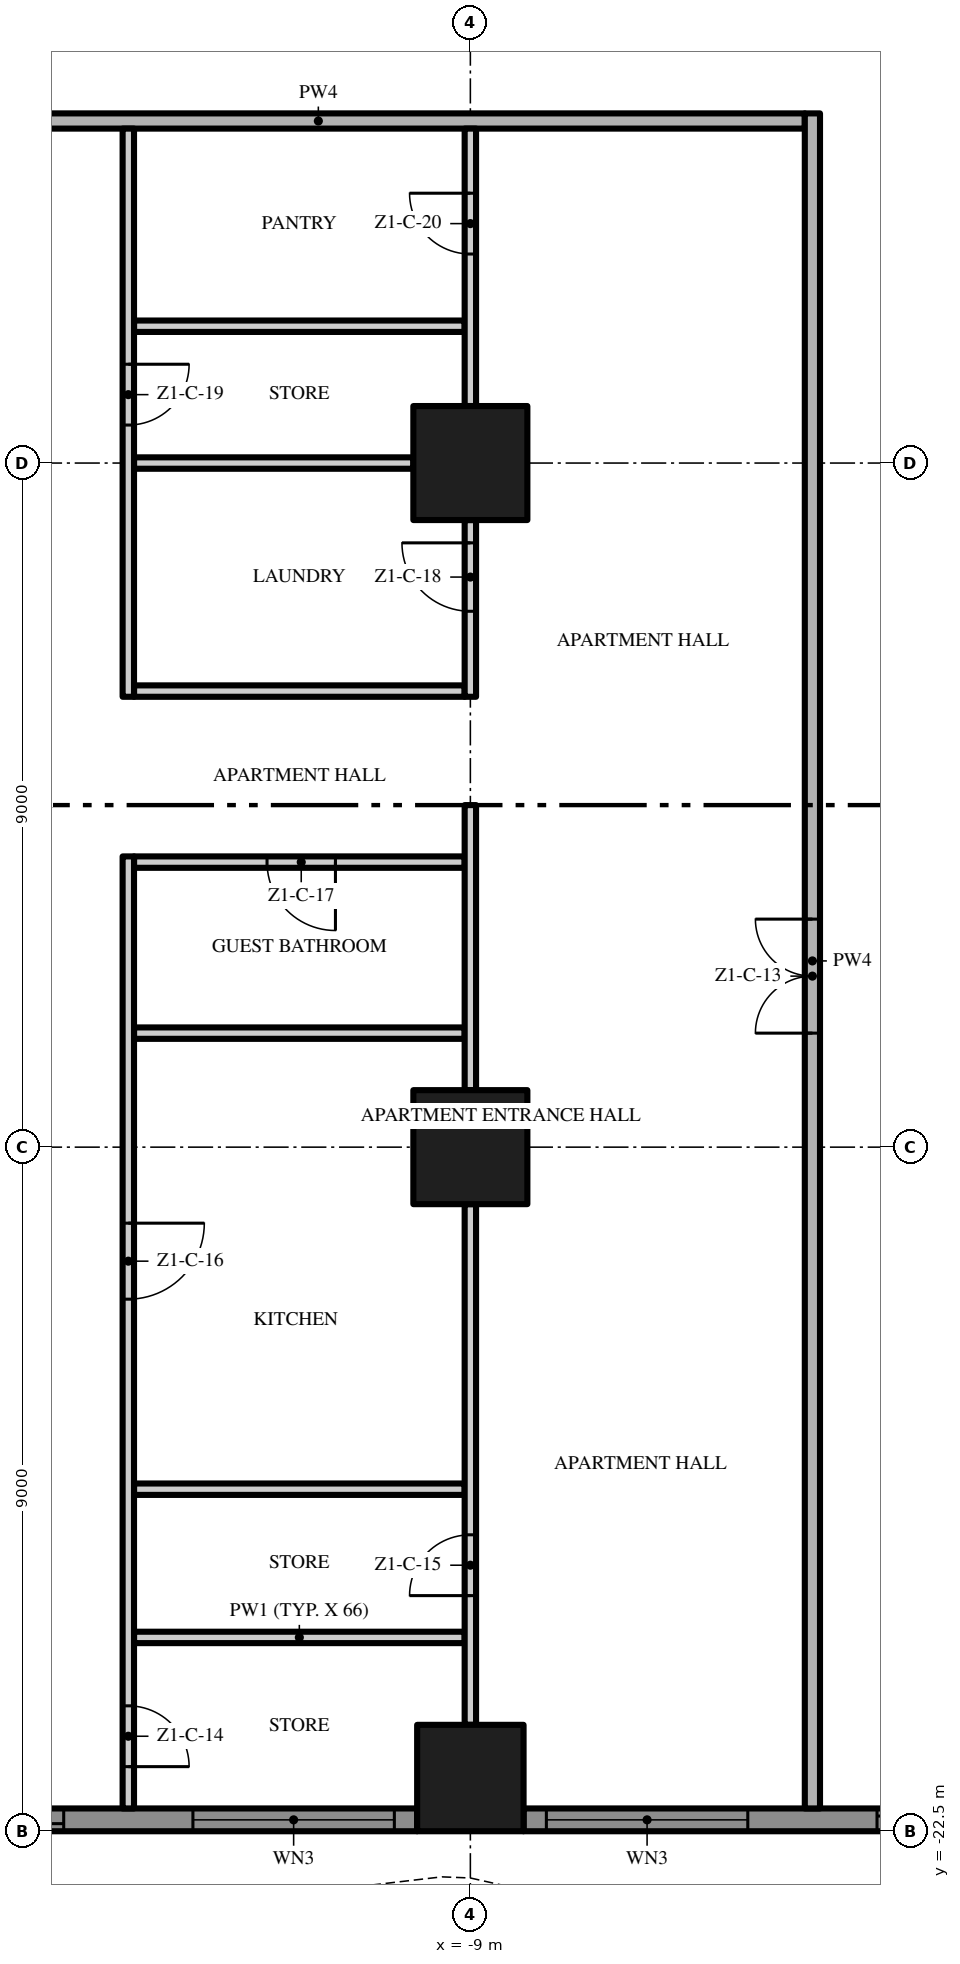
"""IFC4 building model, lengths in metres.
Left out: names, types, materials, properties, quantities, classifications, styles, units other than length and angle.
Written with IfcOpenShell. Run it as: python <this file> out.ifc"""

import sys

from ifc_helpers import new_model, si_unit, direction, frame, frame_2d, origin, origin_2d, place, context, subcontext, project, spatial, polyline, rectangle, outline, extrude, element, fill, save


model = new_model("IFC4")
c1 = context("Model", 3, precision=1e-05, world=origin(), true_north=direction((0.0, 1.0)))
c2 = subcontext(c1, "Body", "Model", "MODEL_VIEW")
j1 = project(units=[si_unit("LENGTHUNIT", "METRE"), si_unit("PLANEANGLEUNIT", "RADIAN")], contexts=[c1])
p1 = place(None, origin())
s1 = spatial("IfcSite", under=j1, at=p1, CompositionType="ELEMENT")
p2 = place(p1, origin())
s2 = spatial("IfcBuilding", under=s1, at=p2, CompositionType="ELEMENT")
p3 = place(p2, frame((0.0, 0.0, 41.6)))
s3 = spatial("IfcBuildingStorey", under=s2, at=p3, CompositionType="ELEMENT", Elevation=41.6)
p4 = place(p3, frame((-9.0, -13.5, 0.0), z_axis=(0.0, 0.0, 1.0), x_axis=(1.0, 0.0, 0.0)))
e1 = element("IfcColumn", 1, at=p4, inside=s3, PredefinedType="COLUMN", context=c2, shape_type="SweptSolid", body=[
    extrude(rectangle(XDim=1.5, YDim=1.5, at=origin_2d()), origin(), (0.0, 0.0, 1.0), 3.5),
])
p5 = place(p3, frame((-9.0, -21.8, 0.0), z_axis=(0.0, 0.0, 1.0), x_axis=(1.0, 0.0, 0.0)))
e2 = element("IfcColumn", 2, at=p5, inside=s3, PredefinedType="COLUMN", context=c2, shape_type="SweptSolid", body=[
    extrude(rectangle(XDim=1.4, YDim=1.4, at=origin_2d()), origin(), (0.0, 0.0, 1.0), 3.5),
])
p6 = place(p3, frame((-9.0, -4.5, 0.0), z_axis=(0.0, 0.0, 1.0), x_axis=(1.0, 0.0, 0.0)))
e3 = element("IfcColumn", 3, at=p6, inside=s3, PredefinedType="COLUMN", context=c2, shape_type="SweptSolid", body=[
    extrude(rectangle(XDim=1.5, YDim=1.5, at=origin_2d()), origin(), (0.0, 0.0, 1.0), 3.5),
])
p7 = place(p3, frame((-9.7, -22.35, 0.0), z_axis=(0.0, 0.0, 1.0), x_axis=(-1.0, 0.0, 0.0)))
e4 = element("IfcWall", 4, at=p7, inside=s3, PredefinedType="SOLIDWALL", context=c2, shape_type="SweptSolid", body=[
    extrude(rectangle(XDim=7.6, YDim=0.3, at=frame_2d((3.8, 0.0))), origin(), (0.0, 0.0, 1.0), 3.5),
])
p8 = place(p7, frame((4.65, 0.0, 0.0)))
e5 = element("IfcOpeningElement", 5, at=p8, cuts=e4, PredefinedType="OPENING", context=c2, shape_type="SweptSolid", body=[
    extrude(rectangle(XDim=2.65, YDim=2.4, at=frame_2d((1.325, 1.2))), frame((0.0, 0.16, 0.0), z_axis=(0.0, -1.0, 0.0), x_axis=(1.0, 0.0, 0.0)), (0.0, 0.0, 1.0), 0.32),
])
p9 = place(p7, frame((0.3, 0.0, 0.45)))
e6 = element("IfcOpeningElement", 6, at=p9, cuts=e4, PredefinedType="OPENING", context=c2, shape_type="SweptSolid", body=[
    extrude(rectangle(XDim=2.65, YDim=2.65, at=frame_2d((1.325, 1.325))), frame((0.0, 0.16, 0.0), z_axis=(0.0, -1.0, 0.0), x_axis=(1.0, 0.0, 0.0)), (0.0, 0.0, 1.0), 0.32),
])
p10 = place(p3, frame((-0.7, -22.35, 0.0), z_axis=(0.0, 0.0, 1.0), x_axis=(-1.0, 0.0, 0.0)))
e7 = element("IfcWall", 7, at=p10, inside=s3, PredefinedType="SOLIDWALL", context=c2, shape_type="SweptSolid", body=[
    extrude(rectangle(XDim=7.6, YDim=0.3, at=frame_2d((3.8, 0.0))), origin(), (0.0, 0.0, 1.0), 3.5),
])
p11 = place(p10, frame((4.65, 0.0, 0.45)))
e8 = element("IfcOpeningElement", 8, at=p11, cuts=e7, PredefinedType="OPENING", context=c2, shape_type="SweptSolid", body=[
    extrude(rectangle(XDim=2.65, YDim=2.65, at=frame_2d((1.325, 1.325))), frame((0.0, 0.16, 0.0), z_axis=(0.0, -1.0, 0.0), x_axis=(1.0, 0.0, 0.0)), (0.0, 0.0, 1.0), 0.32),
])
p12 = place(p10, frame((0.3, 0.0, 0.0)))
e9 = element("IfcOpeningElement", 9, at=p12, cuts=e7, PredefinedType="OPENING", context=c2, shape_type="SweptSolid", body=[
    extrude(rectangle(XDim=2.65, YDim=2.4, at=frame_2d((1.325, 1.2))), frame((0.0, 0.16, 0.0), z_axis=(0.0, -1.0, 0.0), x_axis=(1.0, 0.0, 0.0)), (0.0, 0.0, 1.0), 0.32),
])
p13 = place(p3, origin())
e10 = element("IfcWall", 10, at=p13, inside=s3, PredefinedType="USERDEFINED", context=c2, shape_type="SweptSolid", body=[
    extrude(outline(polyline([(-22.5, -23.451), (-21.0, -24.112), (-19.5, -24.845), (-18.0, -25.369), (-16.875, -25.5), (-16.5, -25.485), (-15.0, -25.149), (-13.5, -24.488), (-12.0, -23.755), (-10.5, -23.231), (-9.375, -23.1), (-9.0, -23.115), (-7.5, -23.451), (-6.0, -24.112), (-4.5, -24.845), (-3.0, -25.369), (-1.875, -25.5), (-1.5, -25.485), (0.0, -25.149), (1.5, -24.488), (3.0, -23.755), (4.5, -23.231), (5.625, -23.1), (6.0, -23.115), (7.5, -23.451), (9.0, -24.112), (10.5, -24.845), (12.0, -25.369), (13.125, -25.5), (13.5, -25.485), (15.0, -25.149), (16.5, -24.488), (18.0, -23.755), (19.5, -23.231), (20.625, -23.1), (21.0, -23.115), (22.5, -23.451), (22.555, -23.208), (21.033, -22.866), (20.615, -22.849), (19.444, -22.986), (17.904, -23.524), (16.395, -24.261), (14.921, -24.91), (13.467, -25.236), (13.135, -25.249), (12.056, -25.124), (10.596, -24.614), (9.105, -23.885), (7.579, -23.213), (6.033, -22.866), (5.615, -22.849), (4.444, -22.986), (2.904, -23.524), (1.395, -24.261), (-0.079, -24.91), (-1.533, -25.236), (-1.865, -25.249), (-2.944, -25.124), (-4.404, -24.614), (-5.895, -23.885), (-7.421, -23.213), (-8.967, -22.866), (-9.385, -22.849), (-10.556, -22.986), (-12.096, -23.524), (-13.605, -24.261), (-15.079, -24.91), (-16.533, -25.236), (-16.865, -25.249), (-17.944, -25.124), (-19.404, -24.614), (-20.895, -23.885), (-22.399, -23.223), (-22.5, -23.451)])), origin(), (0.0, 0.0, 1.0), 0.9),
])
for number, where, z_axis, x_axis in (
    (11, (-13.425, -19.95, 0.0), (0.0, 0.0, 1.0), (1.0, 0.0, 0.0)),
    (12, (-13.425, -18.0, 0.0), (0.0, 0.0, 1.0), (1.0, 0.0, 0.0)),
    (13, (-13.425, -12.0, 0.0), (0.0, 0.0, 1.0), (1.0, 0.0, 0.0)),
):
    element("IfcWall", number, at=place(p3, frame(where, z_axis=z_axis, x_axis=x_axis)), inside=s3, PredefinedType="PARTITIONING", context=c2, shape_type="SweptSolid", body=[
        extrude(rectangle(XDim=4.35, YDim=0.15, at=frame_2d((2.175, 0.0))), origin(), (0.0, 0.0, 1.0), 3.5),
    ])
p14 = place(p3, frame((-9.075, -9.75, 0.0), z_axis=(0.0, 0.0, 1.0), x_axis=(-1.0, 0.0, 0.0)))
e14 = element("IfcWall", 14, at=p14, inside=s3, PredefinedType="PARTITIONING", context=c2, shape_type="SweptSolid", body=[
    extrude(rectangle(XDim=4.35, YDim=0.15, at=frame_2d((2.175, 0.0))), origin(), (0.0, 0.0, 1.0), 3.5),
])
p15 = place(p14, frame((1.7, 0.0, 0.0)))
e15 = element("IfcOpeningElement", 15, at=p15, cuts=e14, PredefinedType="OPENING", context=c2, shape_type="SweptSolid", body=[
    extrude(rectangle(XDim=0.9, YDim=2.1, at=frame_2d((0.45, 1.05))), frame((0.0, 0.085, 0.0), z_axis=(0.0, -1.0, 0.0), x_axis=(1.0, 0.0, 0.0)), (0.0, 0.0, 1.0), 0.17),
])
p16 = place(p3, frame((-13.425, -7.5, 0.0), z_axis=(0.0, 0.0, 1.0), x_axis=(1.0, 0.0, 0.0)))
e16 = element("IfcWall", 16, at=p16, inside=s3, PredefinedType="PARTITIONING", context=c2, shape_type="SweptSolid", body=[
    extrude(rectangle(XDim=4.35, YDim=0.15, at=frame_2d((2.175, 0.0))), origin(), (0.0, 0.0, 1.0), 3.5),
])
p17 = place(p3, frame((-13.425, -4.5, 0.0), z_axis=(0.0, 0.0, 1.0), x_axis=(1.0, 0.0, 0.0)))
e17 = element("IfcWall", 17, at=p17, inside=s3, PredefinedType="PARTITIONING", context=c2, shape_type="SweptSolid", body=[
    extrude(rectangle(XDim=3.675, YDim=0.15, at=frame_2d((1.837, 0.0))), origin(), (0.0, 0.0, 1.0), 3.5),
])
p18 = place(p3, frame((-13.425, -2.7, 0.0), z_axis=(0.0, 0.0, 1.0), x_axis=(1.0, 0.0, 0.0)))
e18 = element("IfcWall", 18, at=p18, inside=s3, PredefinedType="PARTITIONING", context=c2, shape_type="SweptSolid", body=[
    extrude(rectangle(XDim=4.35, YDim=0.15, at=frame_2d((2.175, 0.0))), origin(), (0.0, 0.0, 1.0), 3.5),
])
p19 = place(p3, frame((-17.4, 0.0, 0.0), z_axis=(0.0, 0.0, 1.0), x_axis=(1.0, 0.0, 0.0)))
e19 = element("IfcWall", 19, at=p19, inside=s3, PredefinedType="PARTITIONING", context=c2, shape_type="SweptSolid", body=[
    extrude(rectangle(XDim=12.8, YDim=0.2, at=frame_2d((6.4, 0.0))), origin(), (0.0, 0.0, 1.0), 3.5),
])
p20 = place(p3, frame((-13.5, -9.675, 0.0), z_axis=(0.0, 0.0, 1.0), x_axis=(0.0, -1.0, 0.0)))
e20 = element("IfcWall", 20, at=p20, inside=s3, PredefinedType="PARTITIONING", context=c2, shape_type="SweptSolid", body=[
    extrude(rectangle(XDim=12.525, YDim=0.15, at=frame_2d((6.263, 0.0))), origin(), (0.0, 0.0, 1.0), 3.5),
])
p21 = place(p20, frame((11.175, 0.0, 0.0)))
e21 = element("IfcOpeningElement", 21, at=p21, cuts=e20, PredefinedType="OPENING", context=c2, shape_type="SweptSolid", body=[
    extrude(rectangle(XDim=0.8, YDim=2.0, at=frame_2d((0.4, 1.0))), frame((0.0, 0.085, 0.0), z_axis=(0.0, -1.0, 0.0), x_axis=(1.0, 0.0, 0.0)), (0.0, 0.0, 1.0), 0.17),
])
p22 = place(p20, frame((4.825, 0.0, 0.0)))
e22 = element("IfcOpeningElement", 22, at=p22, cuts=e20, PredefinedType="OPENING", context=c2, shape_type="SweptSolid", body=[
    extrude(rectangle(XDim=1.0, YDim=2.4, at=frame_2d((0.5, 1.2))), frame((0.0, 0.085, 0.0), z_axis=(0.0, -1.0, 0.0), x_axis=(1.0, 0.0, 0.0)), (0.0, 0.0, 1.0), 0.17),
])
p23 = place(p3, frame((-13.5, -0.1, 0.0), z_axis=(0.0, 0.0, 1.0), x_axis=(0.0, -1.0, 0.0)))
e23 = element("IfcWall", 23, at=p23, inside=s3, PredefinedType="PARTITIONING", context=c2, shape_type="SweptSolid", body=[
    extrude(rectangle(XDim=7.475, YDim=0.15, at=frame_2d((3.737, 0.0))), origin(), (0.0, 0.0, 1.0), 3.5),
])
p24 = place(p23, frame((3.1, 0.0, 0.0)))
e24 = element("IfcOpeningElement", 24, at=p24, cuts=e23, PredefinedType="OPENING", context=c2, shape_type="SweptSolid", body=[
    extrude(rectangle(XDim=0.8, YDim=2.0, at=frame_2d((0.4, 1.0))), frame((0.0, 0.085, 0.0), z_axis=(0.0, -1.0, 0.0), x_axis=(1.0, 0.0, 0.0)), (0.0, 0.0, 1.0), 0.17),
])
p25 = place(p3, frame((-9.0, -21.1, 0.0), z_axis=(0.0, 0.0, 1.0), x_axis=(0.0, 1.0, 0.0)))
e25 = element("IfcWall", 25, at=p25, inside=s3, PredefinedType="PARTITIONING", context=c2, shape_type="SweptSolid", body=[
    extrude(rectangle(XDim=6.85, YDim=0.15, at=frame_2d((3.425, 0.0))), origin(), (0.0, 0.0, 1.0), 3.5),
])
p26 = place(p25, frame((1.7, 0.0, 0.0)))
e26 = element("IfcOpeningElement", 26, at=p26, cuts=e25, PredefinedType="OPENING", context=c2, shape_type="SweptSolid", body=[
    extrude(rectangle(XDim=0.8, YDim=2.0, at=frame_2d((0.4, 1.0))), frame((0.0, 0.085, 0.0), z_axis=(0.0, -1.0, 0.0), x_axis=(1.0, 0.0, 0.0)), (0.0, 0.0, 1.0), 0.17),
])
p27 = place(p3, frame((-9.0, -12.75, 0.0), z_axis=(0.0, 0.0, 1.0), x_axis=(0.0, 1.0, 0.0)))
e27 = element("IfcWall", 27, at=p27, inside=s3, PredefinedType="PARTITIONING", context=c2, shape_type="SweptSolid", body=[
    extrude(rectangle(XDim=3.75, YDim=0.15, at=frame_2d((1.875, 0.0))), origin(), (0.0, 0.0, 1.0), 3.5),
])
p28 = place(p3, frame((-9.0, -7.575, 0.0), z_axis=(0.0, 0.0, 1.0), x_axis=(0.0, 1.0, 0.0)))
e28 = element("IfcWall", 28, at=p28, inside=s3, PredefinedType="PARTITIONING", context=c2, shape_type="SweptSolid", body=[
    extrude(rectangle(XDim=2.325, YDim=0.15, at=frame_2d((1.163, 0.0))), origin(), (0.0, 0.0, 1.0), 3.5),
])
p29 = place(p28, frame((1.125, 0.0, 0.0)))
e29 = element("IfcOpeningElement", 29, at=p29, cuts=e28, PredefinedType="OPENING", context=c2, shape_type="SweptSolid", body=[
    extrude(rectangle(XDim=0.9, YDim=2.1, at=frame_2d((0.45, 1.05))), frame((0.0, 0.085, 0.0), z_axis=(0.0, -1.0, 0.0), x_axis=(1.0, 0.0, 0.0)), (0.0, 0.0, 1.0), 0.17),
])
p30 = place(p3, frame((-9.0, -3.75, 0.0), z_axis=(0.0, 0.0, 1.0), x_axis=(0.0, 1.0, 0.0)))
e30 = element("IfcWall", 30, at=p30, inside=s3, PredefinedType="PARTITIONING", context=c2, shape_type="SweptSolid", body=[
    extrude(rectangle(XDim=3.65, YDim=0.15, at=frame_2d((1.825, 0.0))), origin(), (0.0, 0.0, 1.0), 3.5),
])
p31 = place(p30, frame((2.0, 0.0, 0.0)))
e31 = element("IfcOpeningElement", 31, at=p31, cuts=e30, PredefinedType="OPENING", context=c2, shape_type="SweptSolid", body=[
    extrude(rectangle(XDim=0.8, YDim=2.0, at=frame_2d((0.4, 1.0))), frame((0.0, 0.085, 0.0), z_axis=(0.0, -1.0, 0.0), x_axis=(1.0, 0.0, 0.0)), (0.0, 0.0, 1.0), 0.17),
])
p32 = place(p3, frame((-4.5, -22.2, 0.0), z_axis=(0.0, 0.0, 1.0), x_axis=(0.0, 1.0, 0.0)))
e32 = element("IfcWall", 32, at=p32, inside=s3, PredefinedType="PARTITIONING", context=c2, shape_type="SweptSolid", body=[
    extrude(rectangle(XDim=22.3, YDim=0.2, at=frame_2d((11.15, 0.0))), origin(), (0.0, 0.0, 1.0), 3.5),
])
p33 = place(p32, frame((10.2, 0.0, 0.0)))
e33 = element("IfcOpeningElement", 33, at=p33, cuts=e32, PredefinedType="OPENING", context=c2, shape_type="SweptSolid", body=[
    extrude(rectangle(XDim=1.5, YDim=2.4, at=frame_2d((0.75, 1.2))), frame((0.0, 0.11, 0.0), z_axis=(0.0, -1.0, 0.0), x_axis=(1.0, 0.0, 0.0)), (0.0, 0.0, 1.0), 0.22),
])
p34 = place(p8, origin())
e34 = element("IfcDoor", 34, at=p34, inside=s3, OperationType="SINGLE_SWING_LEFT", PredefinedType="DOOR", context=c2, shape_type="SweptSolid", body=[
    extrude(rectangle(XDim=2.65, YDim=2.4, at=frame_2d((1.325, 1.2))), frame((0.0, 0.025, 0.0), z_axis=(0.0, -1.0, 0.0), x_axis=(1.0, 0.0, 0.0)), (0.0, 0.0, 1.0), 0.05),
])
fill(e5, e34)
p35 = place(p9, origin())
e35 = element("IfcWindow", 35, at=p35, inside=s3, PartitioningType="SINGLE_PANEL", PredefinedType="WINDOW", context=c2, shape_type="SweptSolid", body=[
    extrude(rectangle(XDim=2.65, YDim=2.65, at=frame_2d((1.325, 1.325))), frame((0.0, 0.03, 0.0), z_axis=(0.0, -1.0, 0.0), x_axis=(1.0, 0.0, 0.0)), (0.0, 0.0, 1.0), 0.06),
])
fill(e6, e35)
p36 = place(p11, origin())
e36 = element("IfcWindow", 36, at=p36, inside=s3, PartitioningType="SINGLE_PANEL", PredefinedType="WINDOW", context=c2, shape_type="SweptSolid", body=[
    extrude(rectangle(XDim=2.65, YDim=2.65, at=frame_2d((1.325, 1.325))), frame((0.0, 0.03, 0.0), z_axis=(0.0, -1.0, 0.0), x_axis=(1.0, 0.0, 0.0)), (0.0, 0.0, 1.0), 0.06),
])
fill(e8, e36)
p37 = place(p12, origin())
e37 = element("IfcDoor", 37, at=p37, inside=s3, OperationType="SINGLE_SWING_LEFT", PredefinedType="DOOR", context=c2, shape_type="SweptSolid", body=[
    extrude(rectangle(XDim=2.65, YDim=2.4, at=frame_2d((1.325, 1.2))), frame((0.0, 0.025, 0.0), z_axis=(0.0, -1.0, 0.0), x_axis=(1.0, 0.0, 0.0)), (0.0, 0.0, 1.0), 0.05),
])
fill(e9, e37)
p38 = place(p33, origin())
e38 = element("IfcDoor", 38, at=p38, inside=s3, OperationType="DOUBLE_DOOR_SINGLE_SWING", PredefinedType="DOOR", context=c2, shape_type="SweptSolid", body=[
    extrude(rectangle(XDim=1.5, YDim=2.4, at=frame_2d((0.75, 1.2))), frame((0.0, 0.025, 0.0), z_axis=(0.0, -1.0, 0.0), x_axis=(1.0, 0.0, 0.0)), (0.0, 0.0, 1.0), 0.05),
])
fill(e33, e38)
p39 = place(p21, origin())
e39 = element("IfcDoor", 39, at=p39, inside=s3, OperationType="SINGLE_SWING_RIGHT", PredefinedType="DOOR", context=c2, shape_type="SweptSolid", body=[
    extrude(rectangle(XDim=0.8, YDim=2.0, at=frame_2d((0.4, 1.0))), frame((0.0, 0.025, 0.0), z_axis=(0.0, -1.0, 0.0), x_axis=(1.0, 0.0, 0.0)), (0.0, 0.0, 1.0), 0.05),
])
fill(e21, e39)
p40 = place(p26, origin())
e40 = element("IfcDoor", 40, at=p40, inside=s3, OperationType="SINGLE_SWING_LEFT", PredefinedType="DOOR", context=c2, shape_type="SweptSolid", body=[
    extrude(rectangle(XDim=0.8, YDim=2.0, at=frame_2d((0.4, 1.0))), frame((0.0, 0.025, 0.0), z_axis=(0.0, -1.0, 0.0), x_axis=(1.0, 0.0, 0.0)), (0.0, 0.0, 1.0), 0.05),
])
fill(e26, e40)
p41 = place(p22, origin())
e41 = element("IfcDoor", 41, at=p41, inside=s3, OperationType="SINGLE_SWING_LEFT", PredefinedType="DOOR", context=c2, shape_type="SweptSolid", body=[
    extrude(rectangle(XDim=1.0, YDim=2.4, at=frame_2d((0.5, 1.2))), frame((0.0, 0.025, 0.0), z_axis=(0.0, -1.0, 0.0), x_axis=(1.0, 0.0, 0.0)), (0.0, 0.0, 1.0), 0.05),
])
fill(e22, e41)
p42 = place(p15, origin())
e42 = element("IfcDoor", 42, at=p42, inside=s3, OperationType="SINGLE_SWING_LEFT", PredefinedType="DOOR", context=c2, shape_type="SweptSolid", body=[
    extrude(rectangle(XDim=0.9, YDim=2.1, at=frame_2d((0.45, 1.05))), frame((0.0, 0.025, 0.0), z_axis=(0.0, -1.0, 0.0), x_axis=(1.0, 0.0, 0.0)), (0.0, 0.0, 1.0), 0.05),
])
fill(e15, e42)
p43 = place(p29, origin())
e43 = element("IfcDoor", 43, at=p43, inside=s3, OperationType="SINGLE_SWING_RIGHT", PredefinedType="DOOR", context=c2, shape_type="SweptSolid", body=[
    extrude(rectangle(XDim=0.9, YDim=2.1, at=frame_2d((0.45, 1.05))), frame((0.0, 0.025, 0.0), z_axis=(0.0, -1.0, 0.0), x_axis=(1.0, 0.0, 0.0)), (0.0, 0.0, 1.0), 0.05),
])
fill(e29, e43)
p44 = place(p24, origin())
e44 = element("IfcDoor", 44, at=p44, inside=s3, OperationType="SINGLE_SWING_LEFT", PredefinedType="DOOR", context=c2, shape_type="SweptSolid", body=[
    extrude(rectangle(XDim=0.8, YDim=2.0, at=frame_2d((0.4, 1.0))), frame((0.0, 0.025, 0.0), z_axis=(0.0, -1.0, 0.0), x_axis=(1.0, 0.0, 0.0)), (0.0, 0.0, 1.0), 0.05),
])
fill(e24, e44)
p45 = place(p31, origin())
e45 = element("IfcDoor", 45, at=p45, inside=s3, OperationType="SINGLE_SWING_RIGHT", PredefinedType="DOOR", context=c2, shape_type="SweptSolid", body=[
    extrude(rectangle(XDim=0.8, YDim=2.0, at=frame_2d((0.4, 1.0))), frame((0.0, 0.025, 0.0), z_axis=(0.0, -1.0, 0.0), x_axis=(1.0, 0.0, 0.0)), (0.0, 0.0, 1.0), 0.05),
])
fill(e31, e45)
save(model, sys.argv[1])
